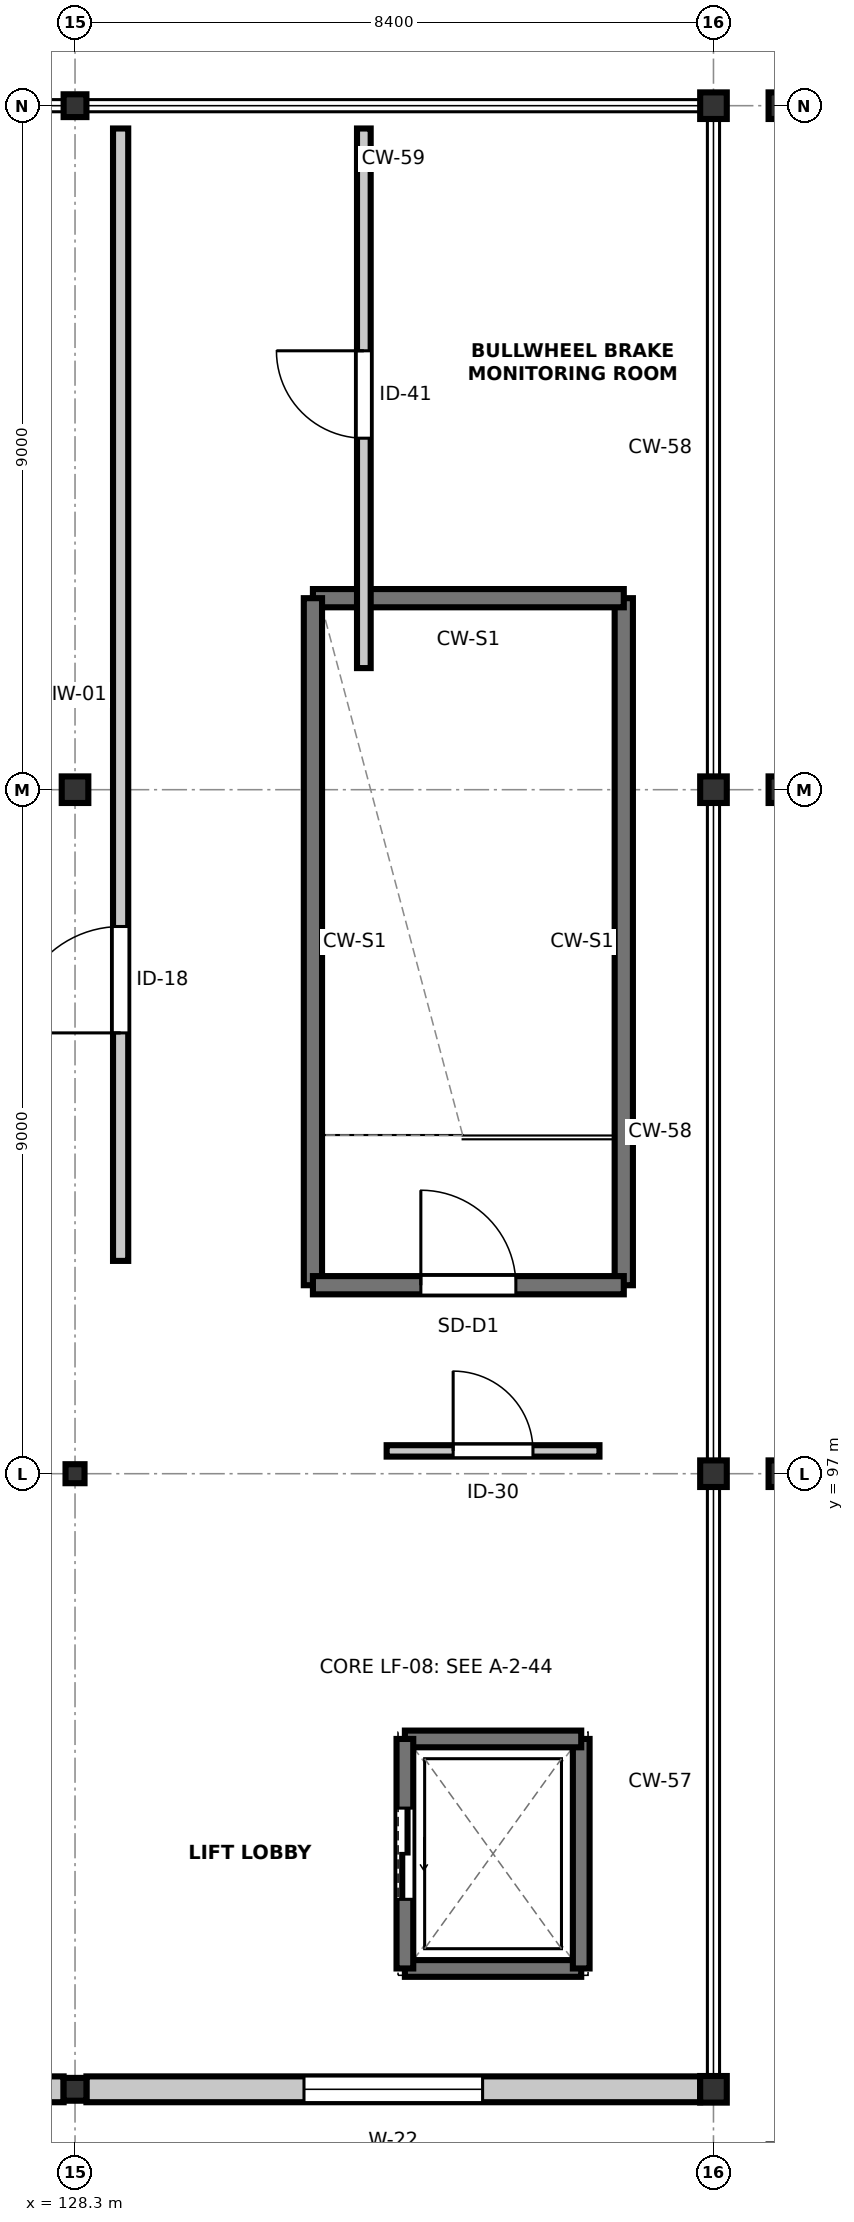
"""IFC4 building model, lengths in metres.
Left out: names, types, materials, properties, quantities, classifications, styles, units other than length and angle.
Written with IfcOpenShell. Run it as: python <this file> out.ifc"""

import sys

from ifc_helpers import new_model, si_unit, direction, frame, frame_2d, origin, origin_2d, place, context, subcontext, project, spatial, rectangle, hollow_rectangle, i_section, extrude, element, fill, save


model = new_model("IFC4")
c1 = context("Model", 3, precision=1e-05, world=origin(), true_north=direction((0.0, 1.0)))
c2 = subcontext(c1, "Body", "Model", "MODEL_VIEW")
j1 = project(units=[si_unit("LENGTHUNIT", "METRE"), si_unit("PLANEANGLEUNIT", "RADIAN")], contexts=[c1])
p1 = place(None, origin())
s1 = spatial("IfcSite", under=j1, at=p1, CompositionType="ELEMENT")
p2 = place(p1, origin())
s2 = spatial("IfcBuilding", under=s1, at=p2, CompositionType="ELEMENT")
p3 = place(p2, frame((0.0, 0.0, 24.6)))
s3 = spatial("IfcBuildingStorey", under=s2, at=p3, CompositionType="ELEMENT", Elevation=24.6)
p4 = place(p3, frame((128.3, 88.9, 0.0), z_axis=(0.0, 0.0, 1.0), x_axis=(1.0, 0.0, 0.0)))
e1 = element("IfcColumn", 1, at=p4, inside=s3, PredefinedType="COLUMN", context=c2, shape_type="SweptSolid", body=[
    extrude(hollow_rectangle(XDim=0.3, YDim=0.3, WallThickness=0.012, InnerFilletRadius=0.012, OuterFilletRadius=0.024, at=origin_2d()), origin(), (0.0, 0.0, 1.0), 5.38),
])
p5 = place(p3, frame((128.3, 97.0, 0.0), z_axis=(0.0, 0.0, 1.0), x_axis=(1.0, 0.0, 0.0)))
e2 = element("IfcColumn", 2, at=p5, inside=s3, PredefinedType="COLUMN", context=c2, shape_type="SweptSolid", body=[
    extrude(hollow_rectangle(XDim=0.25, YDim=0.25, WallThickness=0.01, InnerFilletRadius=0.01, OuterFilletRadius=0.02, at=origin_2d()), origin(), (0.0, 0.0, 1.0), 5.38),
])
p6 = place(p3, frame((128.3, 106.0, 0.0), z_axis=(0.0, 0.0, 1.0), x_axis=(1.0, 0.0, 0.0)))
e3 = element("IfcColumn", 3, at=p6, inside=s3, PredefinedType="COLUMN", context=c2, shape_type="SweptSolid", body=[
    extrude(i_section(OverallWidth=0.35, OverallDepth=0.35, WebThickness=0.012, FlangeThickness=0.019, FilletRadius=0.02, at=origin_2d()), origin(), (0.0, 0.0, 1.0), 5.38),
])
p7 = place(p3, frame((128.3, 115.0, 0.0), z_axis=(0.0, 0.0, 1.0), x_axis=(1.0, 0.0, 0.0)))
e4 = element("IfcColumn", 4, at=p7, inside=s3, PredefinedType="COLUMN", context=c2, shape_type="SweptSolid", body=[
    extrude(i_section(OverallWidth=0.3, OverallDepth=0.3, WebThickness=0.01, FlangeThickness=0.015, FilletRadius=0.018, at=origin_2d()), origin(), (0.0, 0.0, 1.0), 5.38),
])
for number, where, z_axis, x_axis in (
    (5, (136.7, 88.9, 0.0), (0.0, 0.0, 1.0), (1.0, 0.0, 0.0)),
    (6, (136.7, 97.0, 0.0), (0.0, 0.0, 1.0), (1.0, 0.0, 0.0)),
    (7, (136.7, 106.0, 0.0), (0.0, 0.0, 1.0), (1.0, 0.0, 0.0)),
    (8, (136.7, 115.0, 0.0), (0.0, 0.0, 1.0), (1.0, 0.0, 0.0)),
):
    element("IfcColumn", number, at=place(p3, frame(where, z_axis=z_axis, x_axis=x_axis)), inside=s3, PredefinedType="COLUMN", context=c2, shape_type="SweptSolid", body=[
        extrude(i_section(OverallWidth=0.35, OverallDepth=0.35, WebThickness=0.012, FlangeThickness=0.019, FilletRadius=0.02, at=origin_2d()), origin(), (0.0, 0.0, 1.0), 5.38),
    ])
for number, where, z_axis, x_axis in (
    (9, (137.6, 97.0, 0.0), (0.0, 0.0, 1.0), (1.0, 0.0, 0.0)),
    (10, (137.6, 106.0, 0.0), (0.0, 0.0, 1.0), (1.0, 0.0, 0.0)),
    (11, (137.6, 115.0, 0.0), (0.0, 0.0, 1.0), (1.0, 0.0, 0.0)),
):
    element("IfcColumn", number, at=place(p3, frame(where, z_axis=z_axis, x_axis=x_axis)), inside=s3, PredefinedType="COLUMN", context=c2, shape_type="SweptSolid", body=[
        extrude(i_section(OverallWidth=0.35, OverallDepth=0.35, WebThickness=0.012, FlangeThickness=0.019, FilletRadius=0.02, at=origin_2d()), origin(), (0.0, 0.0, 1.0), 3.282),
    ])
p8 = place(p3, frame((120.078, 88.9, 0.0), z_axis=(0.0, 0.0, 1.0), x_axis=(1.0, 0.0, 0.0)))
e12 = element("IfcWall", 12, at=p8, inside=s3, PredefinedType="STANDARD", context=c2, shape_type="SweptSolid", body=[
    extrude(rectangle(XDim=8.072, YDim=0.34, at=frame_2d((4.036, 0.0))), origin(), (0.0, 0.0, 1.0), 4.881),
])
p9 = place(p8, frame((2.861, 0.0, 0.95)))
e13 = element("IfcOpeningElement", 13, at=p9, cuts=e12, PredefinedType="OPENING", context=c2, shape_type="SweptSolid", body=[
    extrude(rectangle(XDim=2.35, YDim=1.45, at=frame_2d((1.175, 0.725))), frame((0.0, 0.18, 0.0), z_axis=(0.0, -1.0, 0.0), x_axis=(1.0, 0.0, 0.0)), (0.0, 0.0, 1.0), 0.36),
])
p10 = place(p3, frame((128.45, 88.9, 0.0), z_axis=(0.0, 0.0, 1.0), x_axis=(1.0, 0.0, 0.0)))
e14 = element("IfcWall", 14, at=p10, inside=s3, PredefinedType="STANDARD", context=c2, shape_type="SweptSolid", body=[
    extrude(rectangle(XDim=8.075, YDim=0.34, at=frame_2d((4.038, 0.0))), origin(), (0.0, 0.0, 1.0), 4.881),
])
p11 = place(p10, frame((2.863, 0.0, 0.95)))
e15 = element("IfcOpeningElement", 15, at=p11, cuts=e14, PredefinedType="OPENING", context=c2, shape_type="SweptSolid", body=[
    extrude(rectangle(XDim=2.35, YDim=1.7, at=frame_2d((1.175, 0.85))), frame((0.0, 0.18, 0.0), z_axis=(0.0, -1.0, 0.0), x_axis=(1.0, 0.0, 0.0)), (0.0, 0.0, 1.0), 0.36),
])
p12 = place(p3, frame((135.52, 99.48, 0.0), z_axis=(0.0, 0.0, 1.0), x_axis=(0.0, 1.0, 0.0)))
e16 = element("IfcWall", 16, at=p12, inside=s3, PredefinedType="SHEAR", context=c2, shape_type="SweptSolid", body=[
    extrude(rectangle(XDim=9.04, YDim=0.24, at=frame_2d((4.52, 0.0))), origin(), (0.0, 0.0, 1.0), 4.881),
])
p13 = place(p3, frame((135.52, 108.52, 0.0), z_axis=(0.0, 0.0, 1.0), x_axis=(-1.0, 0.0, 0.0)))
e17 = element("IfcWall", 17, at=p13, inside=s3, PredefinedType="SHEAR", context=c2, shape_type="SweptSolid", body=[
    extrude(rectangle(XDim=4.09, YDim=0.24, at=frame_2d((2.045, 0.0))), origin(), (0.0, 0.0, 1.0), 5.2),
])
p14 = place(p3, frame((131.43, 108.52, 0.0), z_axis=(0.0, 0.0, 1.0), x_axis=(0.0, -1.0, 0.0)))
e18 = element("IfcWall", 18, at=p14, inside=s3, PredefinedType="SHEAR", context=c2, shape_type="SweptSolid", body=[
    extrude(rectangle(XDim=9.04, YDim=0.24, at=frame_2d((4.52, 0.0))), origin(), (0.0, 0.0, 1.0), 4.881),
])
p15 = place(p3, frame((131.43, 99.48, 0.0), z_axis=(0.0, 0.0, 1.0), x_axis=(1.0, 0.0, 0.0)))
e19 = element("IfcWall", 19, at=p15, inside=s3, PredefinedType="SHEAR", context=c2, shape_type="SweptSolid", body=[
    extrude(rectangle(XDim=4.09, YDim=0.24, at=frame_2d((2.045, 0.0))), origin(), (0.0, 0.0, 1.0), 5.2),
])
p16 = place(p15, frame((1.42, 0.0, 0.0)))
e20 = element("IfcOpeningElement", 20, at=p16, cuts=e19, PredefinedType="OPENING", context=c2, shape_type="SweptSolid", body=[
    extrude(rectangle(XDim=1.25, YDim=2.2, at=frame_2d((0.625, 1.1))), frame((0.0, 0.13, 0.0), z_axis=(0.0, -1.0, 0.0), x_axis=(1.0, 0.0, 0.0)), (0.0, 0.0, 1.0), 0.26),
])
p17 = place(p3, frame((132.64, 90.49, 0.0), z_axis=(0.0, 0.0, 1.0), x_axis=(1.0, 0.0, 0.0)))
e21 = element("IfcWall", 21, at=p17, inside=s3, PredefinedType="SHEAR", context=c2, shape_type="SweptSolid", body=[
    extrude(rectangle(XDim=2.32, YDim=0.22, at=frame_2d((1.16, 0.0))), origin(), (0.0, 0.0, 1.0), 4.3),
])
p18 = place(p3, frame((134.96, 90.49, 0.0), z_axis=(0.0, 0.0, 1.0), x_axis=(0.0, 1.0, 0.0)))
e22 = element("IfcWall", 22, at=p18, inside=s3, PredefinedType="SHEAR", context=c2, shape_type="SweptSolid", body=[
    extrude(rectangle(XDim=3.02, YDim=0.22, at=frame_2d((1.51, 0.0))), origin(), (0.0, 0.0, 1.0), 4.3),
])
p19 = place(p3, frame((134.96, 93.51, 0.0), z_axis=(0.0, 0.0, 1.0), x_axis=(-1.0, 0.0, 0.0)))
e23 = element("IfcWall", 23, at=p19, inside=s3, PredefinedType="SHEAR", context=c2, shape_type="SweptSolid", body=[
    extrude(rectangle(XDim=2.32, YDim=0.22, at=frame_2d((1.16, 0.0))), origin(), (0.0, 0.0, 1.0), 4.3),
])
p20 = place(p3, frame((132.64, 93.51, 0.0), z_axis=(0.0, 0.0, 1.0), x_axis=(0.0, -1.0, 0.0)))
e24 = element("IfcWall", 24, at=p20, inside=s3, PredefinedType="SHEAR", context=c2, shape_type="SweptSolid", body=[
    extrude(rectangle(XDim=3.02, YDim=0.22, at=frame_2d((1.51, 0.0))), origin(), (0.0, 0.0, 1.0), 4.3),
])
p21 = place(p20, frame((0.91, 0.0, 0.0)))
e25 = element("IfcOpeningElement", 25, at=p21, cuts=e24, PredefinedType="OPENING", context=c2, shape_type="SweptSolid", body=[
    extrude(rectangle(XDim=1.2, YDim=2.15, at=frame_2d((0.6, 1.075))), frame((0.0, 0.12, 0.0), z_axis=(0.0, -1.0, 0.0), x_axis=(1.0, 0.0, 0.0)), (0.0, 0.0, 1.0), 0.24),
])
p22 = place(p3, frame((128.9, 99.8, 0.0), z_axis=(0.0, 0.0, 1.0), x_axis=(0.0, 1.0, 0.0)))
e26 = element("IfcWall", 26, at=p22, inside=s3, PredefinedType="PARTITIONING", context=c2, shape_type="SweptSolid", body=[
    extrude(rectangle(XDim=14.9, YDim=0.2, at=frame_2d((7.45, 0.0))), origin(), (0.0, 0.0, 1.0), 4.0),
])
p23 = place(p22, frame((3.0, 0.0, 0.0)))
e27 = element("IfcOpeningElement", 27, at=p23, cuts=e26, PredefinedType="OPENING", context=c2, shape_type="SweptSolid", body=[
    extrude(rectangle(XDim=1.4, YDim=2.24, at=frame_2d((0.7, 1.12))), frame((0.0, 0.11, 0.0), z_axis=(0.0, -1.0, 0.0), x_axis=(1.0, 0.0, 0.0)), (0.0, 0.0, 1.0), 0.22),
])
p24 = place(p3, frame((132.1, 107.6, 0.0), z_axis=(0.0, 0.0, 1.0), x_axis=(0.0, 1.0, 0.0)))
e28 = element("IfcWall", 28, at=p24, inside=s3, PredefinedType="PARTITIONING", context=c2, shape_type="SweptSolid", body=[
    extrude(rectangle(XDim=7.1, YDim=0.18, at=frame_2d((3.55, 0.0))), origin(), (0.0, 0.0, 1.0), 4.0),
])
p25 = place(p24, frame((3.025, 0.0, 0.0)))
e29 = element("IfcOpeningElement", 29, at=p25, cuts=e28, PredefinedType="OPENING", context=c2, shape_type="SweptSolid", body=[
    extrude(rectangle(XDim=1.15, YDim=2.13, at=frame_2d((0.575, 1.065))), frame((0.0, 0.1, 0.0), z_axis=(0.0, -1.0, 0.0), x_axis=(1.0, 0.0, 0.0)), (0.0, 0.0, 1.0), 0.2),
])
p26 = place(p3, frame((132.4, 97.3, 0.0), z_axis=(0.0, 0.0, 1.0), x_axis=(1.0, 0.0, 0.0)))
e30 = element("IfcWall", 30, at=p26, inside=s3, PredefinedType="PARTITIONING", context=c2, shape_type="SweptSolid", body=[
    extrude(rectangle(XDim=2.8, YDim=0.15, at=frame_2d((1.4, 0.0))), origin(), (0.0, 0.0, 1.0), 4.0),
])
p27 = place(p26, frame((0.875, 0.0, 0.0)))
e31 = element("IfcOpeningElement", 31, at=p27, cuts=e30, PredefinedType="OPENING", context=c2, shape_type="SweptSolid", body=[
    extrude(rectangle(XDim=1.05, YDim=2.14, at=frame_2d((0.525, 1.07))), frame((0.0, 0.085, 0.0), z_axis=(0.0, -1.0, 0.0), x_axis=(1.0, 0.0, 0.0)), (0.0, 0.0, 1.0), 0.17),
])
p28 = place(p11, origin())
e32 = element("IfcWindow", 32, at=p28, inside=s3, PartitioningType="SINGLE_PANEL", PredefinedType="WINDOW", context=c2, shape_type="SweptSolid", body=[
    extrude(rectangle(XDim=2.35, YDim=1.7, at=frame_2d((1.175, 0.85))), frame((0.0, 0.03, 0.0), z_axis=(0.0, -1.0, 0.0), x_axis=(1.0, 0.0, 0.0)), (0.0, 0.0, 1.0), 0.06),
])
fill(e15, e32)
p29 = place(p16, origin())
e33 = element("IfcDoor", 33, at=p29, inside=s3, OperationType="SINGLE_SWING_LEFT", PredefinedType="DOOR", context=c2, shape_type="SweptSolid", body=[
    extrude(rectangle(XDim=1.25, YDim=2.2, at=frame_2d((0.625, 1.1))), frame((0.0, 0.025, 0.0), z_axis=(0.0, -1.0, 0.0), x_axis=(1.0, 0.0, 0.0)), (0.0, 0.0, 1.0), 0.05),
])
fill(e20, e33)
p30 = place(p21, origin())
e34 = element("IfcDoor", 34, at=p30, inside=s3, OperationType="DOUBLE_DOOR_SLIDING", PredefinedType="DOOR", context=c2, shape_type="SweptSolid", body=[
    extrude(rectangle(XDim=1.2, YDim=2.15, at=frame_2d((0.6, 1.075))), frame((0.0, 0.025, 0.0), z_axis=(0.0, -1.0, 0.0), x_axis=(1.0, 0.0, 0.0)), (0.0, 0.0, 1.0), 0.05),
])
fill(e25, e34)
p31 = place(p23, origin())
e35 = element("IfcDoor", 35, at=p31, inside=s3, OperationType="SINGLE_SWING_LEFT", PredefinedType="DOOR", context=c2, shape_type="SweptSolid", body=[
    extrude(rectangle(XDim=1.4, YDim=2.24, at=frame_2d((0.7, 1.12))), frame((0.0, 0.025, 0.0), z_axis=(0.0, -1.0, 0.0), x_axis=(1.0, 0.0, 0.0)), (0.0, 0.0, 1.0), 0.05),
])
fill(e27, e35)
p32 = place(p25, origin())
e36 = element("IfcDoor", 36, at=p32, inside=s3, OperationType="SINGLE_SWING_RIGHT", PredefinedType="DOOR", context=c2, shape_type="SweptSolid", body=[
    extrude(rectangle(XDim=1.15, YDim=2.13, at=frame_2d((0.575, 1.065))), frame((0.0, 0.025, 0.0), z_axis=(0.0, -1.0, 0.0), x_axis=(1.0, 0.0, 0.0)), (0.0, 0.0, 1.0), 0.05),
])
fill(e29, e36)
p33 = place(p27, origin())
e37 = element("IfcDoor", 37, at=p33, inside=s3, OperationType="SINGLE_SWING_LEFT", PredefinedType="DOOR", context=c2, shape_type="SweptSolid", body=[
    extrude(rectangle(XDim=1.05, YDim=2.14, at=frame_2d((0.525, 1.07))), frame((0.0, 0.025, 0.0), z_axis=(0.0, -1.0, 0.0), x_axis=(1.0, 0.0, 0.0)), (0.0, 0.0, 1.0), 0.05),
])
fill(e31, e37)
save(model, sys.argv[1])
